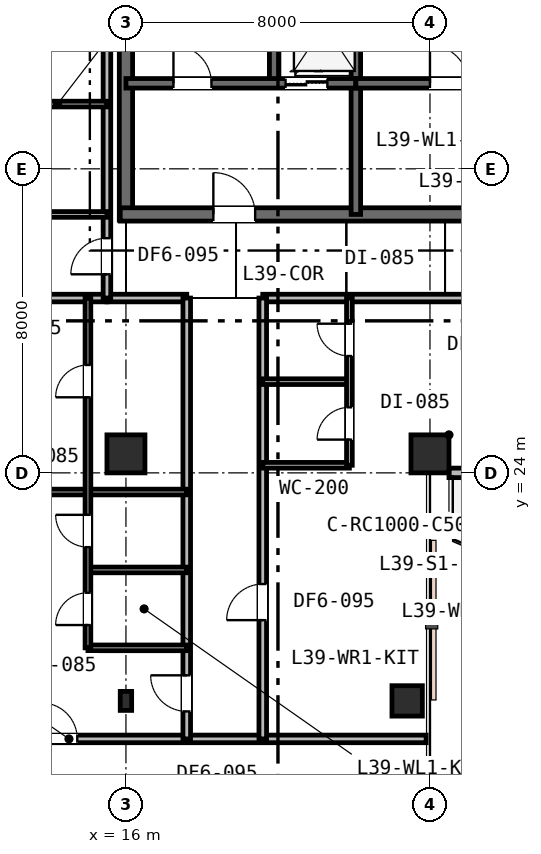
"""IFC4 building model, lengths in metres.
Left out: names, types, materials, properties, quantities, classifications, styles, units other than length and angle.
Written with IfcOpenShell. Run it as: python <this file> out.ifc"""

import sys

from ifc_helpers import new_model, si_unit, direction, frame, frame_2d, origin, origin_2d, place, context, subcontext, project, spatial, rectangle, i_section, extrude, element, fill, save


model = new_model("IFC4")
c1 = context("Model", 3, precision=1e-05, world=origin(), true_north=direction((0.0, 1.0)))
c2 = subcontext(c1, "Body", "Model", "MODEL_VIEW")
j1 = project(units=[si_unit("LENGTHUNIT", "METRE"), si_unit("PLANEANGLEUNIT", "RADIAN")], contexts=[c1])
p1 = place(None, origin())
s1 = spatial("IfcSite", under=j1, at=p1, CompositionType="ELEMENT")
p2 = place(p1, origin())
s2 = spatial("IfcBuilding", under=s1, at=p2, CompositionType="ELEMENT")
p3 = place(p2, frame((0.0, 0.0, 154.2)))
s3 = spatial("IfcBuildingStorey", under=s2, at=p3, CompositionType="ELEMENT", Elevation=154.2)
p4 = place(p3, frame((16.0, 30.65, 0.0), z_axis=(0.0, 0.0, 1.0), x_axis=(0.0, 1.0, 0.0)))
e1 = element("IfcWall", 1, at=p4, inside=s3, PredefinedType="SHEAR", context=c2, shape_type="SweptSolid", body=[
    extrude(rectangle(XDim=12.3, YDim=0.35, at=frame_2d((6.15, 0.0))), origin(), (0.0, 0.0, 1.0), 3.6),
])
p5 = place(p3, frame((15.85, 30.8, 0.0), z_axis=(0.0, 0.0, 1.0), x_axis=(1.0, 0.0, 0.0)))
e2 = element("IfcWall", 2, at=p5, inside=s3, PredefinedType="SHEAR", context=c2, shape_type="SweptSolid", body=[
    extrude(rectangle(XDim=11.2, YDim=0.35, at=frame_2d((5.6, 0.0))), origin(), (0.0, 0.0, 1.0), 3.6),
])
p6 = place(p5, frame((2.45, 0.0, 0.0)))
e3 = element("IfcOpeningElement", 3, at=p6, cuts=e2, PredefinedType="OPENING", context=c2, shape_type="SweptSolid", body=[
    extrude(rectangle(XDim=1.1, YDim=2.15, at=frame_2d((0.55, 1.075))), frame((0.0, 0.185, 0.0), z_axis=(0.0, -1.0, 0.0), x_axis=(1.0, 0.0, 0.0)), (0.0, 0.0, 1.0), 0.37),
])
p7 = place(p3, frame((19.9, 34.25, 0.0), z_axis=(0.0, 0.0, 1.0), x_axis=(0.0, 1.0, 0.0)))
e4 = element("IfcWall", 4, at=p7, inside=s3, PredefinedType="SHEAR", context=c2, shape_type="SweptSolid", body=[
    extrude(rectangle(XDim=8.65, YDim=0.25, at=frame_2d((4.325, 0.0))), origin(), (0.0, 0.0, 1.0), 3.6),
])
p8 = place(p3, frame((22.05, 30.8, 0.0), z_axis=(0.0, 0.0, 1.0), x_axis=(0.0, 1.0, 0.0)))
e5 = element("IfcWall", 5, at=p8, inside=s3, PredefinedType="SHEAR", context=c2, shape_type="SweptSolid", body=[
    extrude(rectangle(XDim=6.45, YDim=0.25, at=frame_2d((3.225, 0.0))), origin(), (0.0, 0.0, 1.0), 3.6),
])
p9 = place(p3, frame((16.0, 34.25, 0.0), z_axis=(0.0, 0.0, 1.0), x_axis=(1.0, 0.0, 0.0)))
e6 = element("IfcWall", 6, at=p9, inside=s3, PredefinedType="SHEAR", context=c2, shape_type="SweptSolid", body=[
    extrude(rectangle(XDim=6.05, YDim=0.25, at=frame_2d((3.025, 0.0))), origin(), (0.0, 0.0, 1.0), 3.6),
])
p10 = place(p9, frame((1.25, 0.0, 0.0)))
e7 = element("IfcOpeningElement", 7, at=p10, cuts=e6, PredefinedType="OPENING", context=c2, shape_type="SweptSolid", body=[
    extrude(rectangle(XDim=1.0, YDim=2.15, at=frame_2d((0.5, 1.075))), frame((0.0, 0.135, 0.0), z_axis=(0.0, -1.0, 0.0), x_axis=(1.0, 0.0, 0.0)), (0.0, 0.0, 1.0), 0.27),
])
p11 = place(p9, frame((4.2, 0.0, 0.0)))
e8 = element("IfcOpeningElement", 8, at=p11, cuts=e6, PredefinedType="OPENING", context=c2, shape_type="SweptSolid", body=[
    extrude(rectangle(XDim=1.1, YDim=2.15, at=frame_2d((0.55, 1.075))), frame((0.0, 0.135, 0.0), z_axis=(0.0, -1.0, 0.0), x_axis=(1.0, 0.0, 0.0)), (0.0, 0.0, 1.0), 0.27),
])
p12 = place(p3, frame((22.05, 34.25, 0.0), z_axis=(0.0, 0.0, 1.0), x_axis=(1.0, 0.0, 0.0)))
e9 = element("IfcWall", 9, at=p12, inside=s3, PredefinedType="SHEAR", context=c2, shape_type="SweptSolid", body=[
    extrude(rectangle(XDim=5.0, YDim=0.25, at=frame_2d((2.5, 0.0))), origin(), (0.0, 0.0, 1.0), 3.6),
])
p13 = place(p12, frame((1.95, 0.0, 0.0)))
e10 = element("IfcOpeningElement", 10, at=p13, cuts=e9, PredefinedType="OPENING", context=c2, shape_type="SweptSolid", body=[
    extrude(rectangle(XDim=1.0, YDim=2.15, at=frame_2d((0.5, 1.075))), frame((0.0, 0.135, 0.0), z_axis=(0.0, -1.0, 0.0), x_axis=(1.0, 0.0, 0.0)), (0.0, 0.0, 1.0), 0.27),
])
for number, where, z_axis, x_axis in (
    (11, (16.0, 24.5, 0.0), (0.0, 0.0, 1.0), (1.0, 0.0, 0.0)),
    (12, (24.0, 24.5, 0.0), (0.0, 0.0, 1.0), (1.0, 0.0, 0.0)),
):
    element("IfcColumn", number, at=place(p3, frame(where, z_axis=z_axis, x_axis=x_axis)), inside=s3, PredefinedType="COLUMN", context=c2, shape_type="SweptSolid", body=[
        extrude(rectangle(XDim=1.0, YDim=1.0, at=origin_2d()), origin(), (0.0, 0.0, 1.0), 3.6),
    ])
p14 = place(p3, frame((23.4, 18.0, 0.0), z_axis=(0.0, 0.0, 1.0), x_axis=(1.0, 0.0, 0.0)))
e13 = element("IfcColumn", 13, at=p14, inside=s3, PredefinedType="COLUMN", context=c2, shape_type="SweptSolid", body=[
    extrude(rectangle(XDim=0.8, YDim=0.8, at=origin_2d()), origin(), (0.0, 0.0, 1.0), 3.6),
])
p15 = place(p3, frame((16.0, 18.0, 0.0), z_axis=(0.0, 0.0, 1.0), x_axis=(1.0, 0.0, 0.0)))
e14 = element("IfcColumn", 14, at=p15, inside=s3, PredefinedType="COLUMN", context=c2, shape_type="SweptSolid", body=[
    extrude(i_section(OverallWidth=0.3, OverallDepth=0.5, WebThickness=0.015, FlangeThickness=0.028, FilletRadius=0.027, at=origin_2d()), origin(), (0.0, 0.0, 1.0), 3.6),
])
p16 = place(p3, frame((24.5, 24.0, 0.0), z_axis=(0.0, 0.0, 1.0), x_axis=(1.0, 0.0, 0.0)))
e15 = element("IfcWall", 15, at=p16, inside=s3, PredefinedType="STANDARD", context=c2, shape_type="SweptSolid", body=[
    extrude(rectangle(XDim=1.35, YDim=0.25, at=frame_2d((0.675, 0.0))), origin(), (0.0, 0.0, 1.0), 3.01),
])
p17 = place(p3, frame((5.1, 28.6, 0.0), z_axis=(0.0, 0.0, 1.0), x_axis=(1.0, 0.0, 0.0)))
e16 = element("IfcWall", 16, at=p17, inside=s3, PredefinedType="PARTITIONING", context=c2, shape_type="SweptSolid", body=[
    extrude(rectangle(XDim=10.4, YDim=0.2, at=frame_2d((5.2, 0.0))), origin(), (0.0, 0.0, 1.0), 2.93),
])
p18 = place(p3, frame((15.5, 28.6, 0.0), z_axis=(0.0, 0.0, 1.0), x_axis=(1.0, 0.0, 0.0)))
e17 = element("IfcWall", 17, at=p18, inside=s3, PredefinedType="PARTITIONING", context=c2, shape_type="SweptSolid", body=[
    extrude(rectangle(XDim=2.1, YDim=0.2, at=frame_2d((1.05, 0.0))), origin(), (0.0, 0.0, 1.0), 2.93),
])
p19 = place(p3, frame((19.6, 28.6, 0.0), z_axis=(0.0, 0.0, 1.0), x_axis=(1.0, 0.0, 0.0)))
e18 = element("IfcWall", 18, at=p19, inside=s3, PredefinedType="PARTITIONING", context=c2, shape_type="SweptSolid", body=[
    extrude(rectangle(XDim=31.3, YDim=0.2, at=frame_2d((15.65, 0.0))), origin(), (0.0, 0.0, 1.0), 2.93),
])
p20 = place(p19, frame((5.445, 0.0, 0.0)))
e19 = element("IfcOpeningElement", 19, at=p20, cuts=e18, PredefinedType="OPENING", context=c2, shape_type="SweptSolid", body=[
    extrude(rectangle(XDim=0.95, YDim=2.15, at=frame_2d((0.475, 1.075))), frame((0.0, 0.11, 0.0), z_axis=(0.0, -1.0, 0.0), x_axis=(1.0, 0.0, 0.0)), (0.0, 0.0, 1.0), 0.22),
])
p21 = place(p19, frame((13.35, 0.0, 0.0)))
e20 = element("IfcOpeningElement", 20, at=p21, cuts=e18, PredefinedType="OPENING", context=c2, shape_type="SweptSolid", body=[
    extrude(rectangle(XDim=0.95, YDim=2.15, at=frame_2d((0.475, 1.075))), frame((0.0, 0.11, 0.0), z_axis=(0.0, -1.0, 0.0), x_axis=(1.0, 0.0, 0.0)), (0.0, 0.0, 1.0), 0.22),
])
p22 = place(p19, frame((21.925, 0.0, 0.0)))
e21 = element("IfcOpeningElement", 21, at=p22, cuts=e18, PredefinedType="OPENING", context=c2, shape_type="SweptSolid", body=[
    extrude(rectangle(XDim=0.95, YDim=2.15, at=frame_2d((0.475, 1.075))), frame((0.0, 0.11, 0.0), z_axis=(0.0, -1.0, 0.0), x_axis=(1.0, 0.0, 0.0)), (0.0, 0.0, 1.0), 0.22),
])
p23 = place(p3, frame((15.5, 28.6, 0.0), z_axis=(0.0, 0.0, 1.0), x_axis=(0.0, 1.0, 0.0)))
e22 = element("IfcWall", 22, at=p23, inside=s3, PredefinedType="PARTITIONING", context=c2, shape_type="SweptSolid", body=[
    extrude(rectangle(XDim=14.3, YDim=0.2, at=frame_2d((7.15, 0.0))), origin(), (0.0, 0.0, 1.0), 2.93),
])
p24 = place(p23, frame((0.625, 0.0, 0.0)))
e23 = element("IfcOpeningElement", 23, at=p24, cuts=e22, PredefinedType="OPENING", context=c2, shape_type="SweptSolid", body=[
    extrude(rectangle(XDim=0.95, YDim=2.15, at=frame_2d((0.475, 1.075))), frame((0.0, 0.11, 0.0), z_axis=(0.0, -1.0, 0.0), x_axis=(1.0, 0.0, 0.0)), (0.0, 0.0, 1.0), 0.22),
])
p25 = place(p3, frame((12.9, 30.8, 0.0), z_axis=(0.0, 0.0, 1.0), x_axis=(1.0, 0.0, 0.0)))
e24 = element("IfcWall", 24, at=p25, inside=s3, PredefinedType="PARTITIONING", context=c2, shape_type="SweptSolid", body=[
    extrude(rectangle(XDim=2.6, YDim=0.15, at=frame_2d((1.3, 0.0))), origin(), (0.0, 0.0, 1.0), 2.93),
])
p26 = place(p3, frame((12.9, 33.704, 0.0), z_axis=(0.0, 0.0, 1.0), x_axis=(1.0, 0.0, 0.0)))
e25 = element("IfcWall", 25, at=p26, inside=s3, PredefinedType="PARTITIONING", context=c2, shape_type="SweptSolid", body=[
    extrude(rectangle(XDim=2.6, YDim=0.15, at=frame_2d((1.3, 0.0))), origin(), (0.0, 0.0, 1.0), 3.33),
])
p27 = place(p3, frame((5.1, 17.0, 0.0), z_axis=(0.0, 0.0, 1.0), x_axis=(1.0, 0.0, 0.0)))
e26 = element("IfcWall", 26, at=p27, inside=s3, PredefinedType="PARTITIONING", context=c2, shape_type="SweptSolid", body=[
    extrude(rectangle(XDim=18.8, YDim=0.2, at=frame_2d((9.4, 0.0))), origin(), (0.0, 0.0, 1.0), 2.93),
])
p28 = place(p27, frame((8.669, 0.0, 0.0)))
e27 = element("IfcOpeningElement", 27, at=p28, cuts=e26, PredefinedType="OPENING", context=c2, shape_type="SweptSolid", body=[
    extrude(rectangle(XDim=0.95, YDim=2.15, at=frame_2d((0.475, 1.075))), frame((0.0, 0.11, 0.0), z_axis=(0.0, -1.0, 0.0), x_axis=(1.0, 0.0, 0.0)), (0.0, 0.0, 1.0), 0.22),
])
p29 = place(p3, frame((17.6, 17.0, 0.0), z_axis=(0.0, 0.0, 1.0), x_axis=(0.0, 1.0, 0.0)))
e28 = element("IfcWall", 28, at=p29, inside=s3, PredefinedType="PARTITIONING", context=c2, shape_type="SweptSolid", body=[
    extrude(rectangle(XDim=11.6, YDim=0.2, at=frame_2d((5.8, 0.0))), origin(), (0.0, 0.0, 1.0), 2.93),
])
p30 = place(p29, frame((0.723, 0.0, 0.0)))
e29 = element("IfcOpeningElement", 29, at=p30, cuts=e28, PredefinedType="OPENING", context=c2, shape_type="SweptSolid", body=[
    extrude(rectangle(XDim=0.95, YDim=2.15, at=frame_2d((0.475, 1.075))), frame((0.0, 0.11, 0.0), z_axis=(0.0, -1.0, 0.0), x_axis=(1.0, 0.0, 0.0)), (0.0, 0.0, 1.0), 0.22),
])
for number, where, z_axis, x_axis in (
    (30, (15.0, 19.396, 0.0), (0.0, 0.0, 1.0), (1.0, 0.0, 0.0)),
    (31, (15.0, 21.446, 0.0), (0.0, 0.0, 1.0), (1.0, 0.0, 0.0)),
):
    element("IfcWall", number, at=place(p3, frame(where, z_axis=z_axis, x_axis=x_axis)), inside=s3, PredefinedType="PARTITIONING", context=c2, shape_type="SweptSolid", body=[
        extrude(rectangle(XDim=2.6, YDim=0.15, at=frame_2d((1.3, 0.0))), origin(), (0.0, 0.0, 1.0), 2.93),
    ])
p31 = place(p3, frame((5.1, 23.496, 0.0), z_axis=(0.0, 0.0, 1.0), x_axis=(1.0, 0.0, 0.0)))
e32 = element("IfcWall", 32, at=p31, inside=s3, PredefinedType="PARTITIONING", context=c2, shape_type="SweptSolid", body=[
    extrude(rectangle(XDim=12.5, YDim=0.15, at=frame_2d((6.25, 0.0))), origin(), (0.0, 0.0, 1.0), 2.93),
])
p32 = place(p31, frame((4.692, 0.0, 0.0)))
e33 = element("IfcOpeningElement", 33, at=p32, cuts=e32, PredefinedType="OPENING", context=c2, shape_type="SweptSolid", body=[
    extrude(rectangle(XDim=0.9, YDim=2.15, at=frame_2d((0.45, 1.075))), frame((0.0, 0.085, 0.0), z_axis=(0.0, -1.0, 0.0), x_axis=(1.0, 0.0, 0.0)), (0.0, 0.0, 1.0), 0.17),
])
p33 = place(p3, frame((15.0, 19.396, 0.0), z_axis=(0.0, 0.0, 1.0), x_axis=(0.0, 1.0, 0.0)))
e34 = element("IfcWall", 34, at=p33, inside=s3, PredefinedType="PARTITIONING", context=c2, shape_type="SweptSolid", body=[
    extrude(rectangle(XDim=9.204, YDim=0.15, at=frame_2d((4.602, 0.0))), origin(), (0.0, 0.0, 1.0), 2.93),
])
p34 = place(p33, frame((0.6, 0.0, 0.0)))
e35 = element("IfcOpeningElement", 35, at=p34, cuts=e34, PredefinedType="OPENING", context=c2, shape_type="SweptSolid", body=[
    extrude(rectangle(XDim=0.85, YDim=2.15, at=frame_2d((0.425, 1.075))), frame((0.0, 0.085, 0.0), z_axis=(0.0, -1.0, 0.0), x_axis=(1.0, 0.0, 0.0)), (0.0, 0.0, 1.0), 0.17),
])
p35 = place(p33, frame((2.65, 0.0, 0.0)))
e36 = element("IfcOpeningElement", 36, at=p35, cuts=e34, PredefinedType="OPENING", context=c2, shape_type="SweptSolid", body=[
    extrude(rectangle(XDim=0.85, YDim=2.15, at=frame_2d((0.425, 1.075))), frame((0.0, 0.085, 0.0), z_axis=(0.0, -1.0, 0.0), x_axis=(1.0, 0.0, 0.0)), (0.0, 0.0, 1.0), 0.17),
])
p36 = place(p33, frame((6.593, 0.0, 0.0)))
e37 = element("IfcOpeningElement", 37, at=p36, cuts=e34, PredefinedType="OPENING", context=c2, shape_type="SweptSolid", body=[
    extrude(rectangle(XDim=0.85, YDim=2.15, at=frame_2d((0.425, 1.075))), frame((0.0, 0.085, 0.0), z_axis=(0.0, -1.0, 0.0), x_axis=(1.0, 0.0, 0.0)), (0.0, 0.0, 1.0), 0.17),
])
p37 = place(p3, frame((19.6, 17.0, 0.0), z_axis=(0.0, 0.0, 1.0), x_axis=(0.0, 1.0, 0.0)))
e38 = element("IfcWall", 38, at=p37, inside=s3, PredefinedType="PARTITIONING", context=c2, shape_type="SweptSolid", body=[
    extrude(rectangle(XDim=11.6, YDim=0.2, at=frame_2d((5.8, 0.0))), origin(), (0.0, 0.0, 1.0), 2.93),
])
p38 = place(p37, frame((3.125, 0.0, 0.0)))
e39 = element("IfcOpeningElement", 39, at=p38, cuts=e38, PredefinedType="OPENING", context=c2, shape_type="SweptSolid", body=[
    extrude(rectangle(XDim=0.95, YDim=2.15, at=frame_2d((0.475, 1.075))), frame((0.0, 0.11, 0.0), z_axis=(0.0, -1.0, 0.0), x_axis=(1.0, 0.0, 0.0)), (0.0, 0.0, 1.0), 0.22),
])
p39 = place(p3, frame((19.6, 24.2, 0.0), z_axis=(0.0, 0.0, 1.0), x_axis=(1.0, 0.0, 0.0)))
e40 = element("IfcWall", 40, at=p39, inside=s3, PredefinedType="PARTITIONING", context=c2, shape_type="SweptSolid", body=[
    extrude(rectangle(XDim=2.28, YDim=0.15, at=frame_2d((1.14, 0.0))), origin(), (0.0, 0.0, 1.0), 2.93),
])
p40 = place(p3, frame((19.6, 26.4, 0.0), z_axis=(0.0, 0.0, 1.0), x_axis=(1.0, 0.0, 0.0)))
e41 = element("IfcWall", 41, at=p40, inside=s3, PredefinedType="PARTITIONING", context=c2, shape_type="SweptSolid", body=[
    extrude(rectangle(XDim=2.28, YDim=0.15, at=frame_2d((1.14, 0.0))), origin(), (0.0, 0.0, 1.0), 2.96),
])
p41 = place(p3, frame((21.88, 24.2, 0.0), z_axis=(0.0, 0.0, 1.0), x_axis=(0.0, 1.0, 0.0)))
e42 = element("IfcWall", 42, at=p41, inside=s3, PredefinedType="PARTITIONING", context=c2, shape_type="SweptSolid", body=[
    extrude(rectangle(XDim=4.4, YDim=0.15, at=frame_2d((2.2, 0.0))), origin(), (0.0, 0.0, 1.0), 2.93),
])
p42 = place(p41, frame((0.675, 0.0, 0.0)))
e43 = element("IfcOpeningElement", 43, at=p42, cuts=e42, PredefinedType="OPENING", context=c2, shape_type="SweptSolid", body=[
    extrude(rectangle(XDim=0.85, YDim=2.15, at=frame_2d((0.425, 1.075))), frame((0.0, 0.085, 0.0), z_axis=(0.0, -1.0, 0.0), x_axis=(1.0, 0.0, 0.0)), (0.0, 0.0, 1.0), 0.17),
])
p43 = place(p41, frame((2.875, 0.0, 0.0)))
e44 = element("IfcOpeningElement", 44, at=p43, cuts=e42, PredefinedType="OPENING", context=c2, shape_type="SweptSolid", body=[
    extrude(rectangle(XDim=0.85, YDim=2.15, at=frame_2d((0.425, 1.075))), frame((0.0, 0.085, 0.0), z_axis=(0.0, -1.0, 0.0), x_axis=(1.0, 0.0, 0.0)), (0.0, 0.0, 1.0), 0.17),
])
p44 = place(p10, origin())
e45 = element("IfcDoor", 45, at=p44, inside=s3, OperationType="SINGLE_SWING_LEFT", PredefinedType="DOOR", context=c2, shape_type="SweptSolid", body=[
    extrude(rectangle(XDim=1.0, YDim=2.15, at=frame_2d((0.5, 1.075))), frame((0.0, 0.025, 0.0), z_axis=(0.0, -1.0, 0.0), x_axis=(1.0, 0.0, 0.0)), (0.0, 0.0, 1.0), 0.05),
])
fill(e7, e45)
p45 = place(p6, origin())
e46 = element("IfcDoor", 46, at=p45, inside=s3, OperationType="SINGLE_SWING_LEFT", PredefinedType="DOOR", context=c2, shape_type="SweptSolid", body=[
    extrude(rectangle(XDim=1.1, YDim=2.15, at=frame_2d((0.55, 1.075))), frame((0.0, 0.025, 0.0), z_axis=(0.0, -1.0, 0.0), x_axis=(1.0, 0.0, 0.0)), (0.0, 0.0, 1.0), 0.05),
])
fill(e3, e46)
p46 = place(p13, origin())
e47 = element("IfcDoor", 47, at=p46, inside=s3, OperationType="SINGLE_SWING_LEFT", PredefinedType="DOOR", context=c2, shape_type="SweptSolid", body=[
    extrude(rectangle(XDim=1.0, YDim=2.15, at=frame_2d((0.5, 1.075))), frame((0.0, 0.025, 0.0), z_axis=(0.0, -1.0, 0.0), x_axis=(1.0, 0.0, 0.0)), (0.0, 0.0, 1.0), 0.05),
])
fill(e10, e47)
p47 = place(p24, origin())
e48 = element("IfcDoor", 48, at=p47, inside=s3, OperationType="SINGLE_SWING_LEFT", PredefinedType="DOOR", context=c2, shape_type="SweptSolid", body=[
    extrude(rectangle(XDim=0.95, YDim=2.15, at=frame_2d((0.475, 1.075))), frame((0.0, 0.025, 0.0), z_axis=(0.0, -1.0, 0.0), x_axis=(1.0, 0.0, 0.0)), (0.0, 0.0, 1.0), 0.05),
])
fill(e23, e48)
p48 = place(p30, origin())
e49 = element("IfcDoor", 49, at=p48, inside=s3, OperationType="SINGLE_SWING_RIGHT", PredefinedType="DOOR", context=c2, shape_type="SweptSolid", body=[
    extrude(rectangle(XDim=0.95, YDim=2.15, at=frame_2d((0.475, 1.075))), frame((0.0, 0.025, 0.0), z_axis=(0.0, -1.0, 0.0), x_axis=(1.0, 0.0, 0.0)), (0.0, 0.0, 1.0), 0.05),
])
fill(e29, e49)
p49 = place(p34, origin())
e50 = element("IfcDoor", 50, at=p49, inside=s3, OperationType="SINGLE_SWING_LEFT", PredefinedType="DOOR", context=c2, shape_type="SweptSolid", body=[
    extrude(rectangle(XDim=0.85, YDim=2.15, at=frame_2d((0.425, 1.075))), frame((0.0, 0.025, 0.0), z_axis=(0.0, -1.0, 0.0), x_axis=(1.0, 0.0, 0.0)), (0.0, 0.0, 1.0), 0.05),
])
fill(e35, e50)
p50 = place(p35, origin())
e51 = element("IfcDoor", 51, at=p50, inside=s3, OperationType="SINGLE_SWING_RIGHT", PredefinedType="DOOR", context=c2, shape_type="SweptSolid", body=[
    extrude(rectangle(XDim=0.85, YDim=2.15, at=frame_2d((0.425, 1.075))), frame((0.0, 0.025, 0.0), z_axis=(0.0, -1.0, 0.0), x_axis=(1.0, 0.0, 0.0)), (0.0, 0.0, 1.0), 0.05),
])
fill(e36, e51)
p51 = place(p36, origin())
e52 = element("IfcDoor", 52, at=p51, inside=s3, OperationType="SINGLE_SWING_LEFT", PredefinedType="DOOR", context=c2, shape_type="SweptSolid", body=[
    extrude(rectangle(XDim=0.85, YDim=2.15, at=frame_2d((0.425, 1.075))), frame((0.0, 0.025, 0.0), z_axis=(0.0, -1.0, 0.0), x_axis=(1.0, 0.0, 0.0)), (0.0, 0.0, 1.0), 0.05),
])
fill(e37, e52)
p52 = place(p38, origin())
e53 = element("IfcDoor", 53, at=p52, inside=s3, OperationType="SINGLE_SWING_LEFT", PredefinedType="DOOR", context=c2, shape_type="SweptSolid", body=[
    extrude(rectangle(XDim=0.95, YDim=2.15, at=frame_2d((0.475, 1.075))), frame((0.0, 0.025, 0.0), z_axis=(0.0, -1.0, 0.0), x_axis=(1.0, 0.0, 0.0)), (0.0, 0.0, 1.0), 0.05),
])
fill(e39, e53)
p53 = place(p42, origin())
e54 = element("IfcDoor", 54, at=p53, inside=s3, OperationType="SINGLE_SWING_LEFT", PredefinedType="DOOR", context=c2, shape_type="SweptSolid", body=[
    extrude(rectangle(XDim=0.85, YDim=2.15, at=frame_2d((0.425, 1.075))), frame((0.0, 0.025, 0.0), z_axis=(0.0, -1.0, 0.0), x_axis=(1.0, 0.0, 0.0)), (0.0, 0.0, 1.0), 0.05),
])
fill(e43, e54)
p54 = place(p43, origin())
e55 = element("IfcDoor", 55, at=p54, inside=s3, OperationType="SINGLE_SWING_RIGHT", PredefinedType="DOOR", context=c2, shape_type="SweptSolid", body=[
    extrude(rectangle(XDim=0.85, YDim=2.15, at=frame_2d((0.425, 1.075))), frame((0.0, 0.025, 0.0), z_axis=(0.0, -1.0, 0.0), x_axis=(1.0, 0.0, 0.0)), (0.0, 0.0, 1.0), 0.05),
])
fill(e44, e55)
p55 = place(p28, origin())
e56 = element("IfcDoor", 56, at=p55, inside=s3, OperationType="SINGLE_SWING_LEFT", PredefinedType="DOOR", context=c2, shape_type="SweptSolid", body=[
    extrude(rectangle(XDim=0.95, YDim=2.15, at=frame_2d((0.475, 1.075))), frame((0.0, 0.025, 0.0), z_axis=(0.0, -1.0, 0.0), x_axis=(1.0, 0.0, 0.0)), (0.0, 0.0, 1.0), 0.05),
])
fill(e27, e56)
p56 = place(p11, origin())
e57 = element("IfcDoor", 57, at=p56, inside=s3, OperationType="DOUBLE_DOOR_SLIDING", PredefinedType="DOOR", context=c2, shape_type="SweptSolid", body=[
    extrude(rectangle(XDim=1.1, YDim=2.15, at=frame_2d((0.55, 1.075))), frame((0.0, 0.025, 0.0), z_axis=(0.0, -1.0, 0.0), x_axis=(1.0, 0.0, 0.0)), (0.0, 0.0, 1.0), 0.05),
])
fill(e8, e57)
save(model, sys.argv[1])
